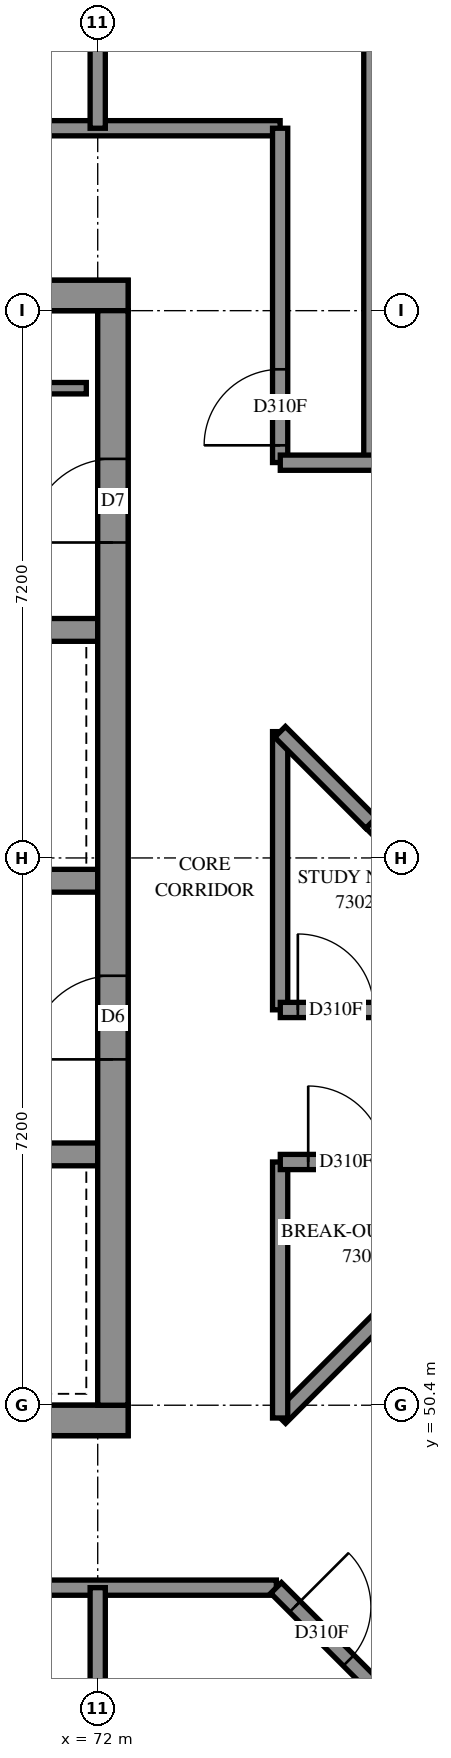
"""IFC4 building model, lengths in metres.
Left out: names, types, materials, properties, quantities, classifications, styles, units other than length and angle.
Written with IfcOpenShell. Run it as: python <this file> out.ifc"""

import sys

from ifc_helpers import new_model, si_unit, direction, frame, frame_2d, origin, place, context, subcontext, project, spatial, rectangle, extrude, element, fill, save


model = new_model("IFC4")
c1 = context("Model", 3, precision=1e-05, world=origin(), true_north=direction((0.0, 1.0)))
c2 = subcontext(c1, "Body", "Model", "MODEL_VIEW")
j1 = project(units=[si_unit("LENGTHUNIT", "METRE"), si_unit("PLANEANGLEUNIT", "RADIAN")], contexts=[c1])
p1 = place(None, origin())
s1 = spatial("IfcSite", under=j1, at=p1, CompositionType="ELEMENT")
p2 = place(p1, origin())
s2 = spatial("IfcBuilding", under=s1, at=p2, CompositionType="ELEMENT")
p3 = place(p2, frame((0.0, 0.0, 267.6)))
s3 = spatial("IfcBuildingStorey", under=s2, at=p3, CompositionType="ELEMENT", Elevation=267.6)
p4 = place(p3, frame((57.2, 50.2, -0.3), z_axis=(0.0, 0.0, 1.0), x_axis=(1.0, 0.0, 0.0)))
e1 = element("IfcWall", 1, at=p4, inside=s3, PredefinedType="SHEAR", context=c2, shape_type="SweptSolid", body=[
    extrude(rectangle(XDim=15.2, YDim=0.4, at=frame_2d((7.6, 0.0))), origin(), (0.0, 0.0, 1.0), 2.7),
])
p5 = place(p3, frame((57.2, 65.0, -0.3), z_axis=(0.0, 0.0, 1.0), x_axis=(1.0, 0.0, 0.0)))
e2 = element("IfcWall", 2, at=p5, inside=s3, PredefinedType="SHEAR", context=c2, shape_type="SweptSolid", body=[
    extrude(rectangle(XDim=15.2, YDim=0.4, at=frame_2d((7.6, 0.0))), origin(), (0.0, 0.0, 1.0), 2.7),
])
p6 = place(p5, frame((10.4, 0.0, 0.3)))
e3 = element("IfcOpeningElement", 3, at=p6, cuts=e2, PredefinedType="OPENING", context=c2, shape_type="SweptSolid", body=[
    extrude(rectangle(XDim=0.8, YDim=2.1, at=frame_2d((0.4, 1.05))), frame((0.0, 0.21, 0.0), z_axis=(0.0, -1.0, 0.0), x_axis=(1.0, 0.0, 0.0)), (0.0, 0.0, 1.0), 0.42),
])
p7 = place(p3, frame((72.2, 50.4, -0.3), z_axis=(0.0, 0.0, 1.0), x_axis=(0.0, 1.0, 0.0)))
e4 = element("IfcWall", 4, at=p7, inside=s3, PredefinedType="SHEAR", context=c2, shape_type="SweptSolid", body=[
    extrude(rectangle(XDim=14.4, YDim=0.4, at=frame_2d((7.2, 0.0))), origin(), (0.0, 0.0, 1.0), 2.7),
])
p8 = place(p7, frame((4.55, 0.0, 0.3)))
e5 = element("IfcOpeningElement", 5, at=p8, cuts=e4, PredefinedType="OPENING", context=c2, shape_type="SweptSolid", body=[
    extrude(rectangle(XDim=1.1, YDim=2.1, at=frame_2d((0.55, 1.05))), frame((0.0, 0.21, 0.0), z_axis=(0.0, -1.0, 0.0), x_axis=(1.0, 0.0, 0.0)), (0.0, 0.0, 1.0), 0.42),
])
p9 = place(p7, frame((11.35, 0.0, 0.3)))
e6 = element("IfcOpeningElement", 6, at=p9, cuts=e4, PredefinedType="OPENING", context=c2, shape_type="SweptSolid", body=[
    extrude(rectangle(XDim=1.1, YDim=2.1, at=frame_2d((0.55, 1.05))), frame((0.0, 0.21, 0.0), z_axis=(0.0, -1.0, 0.0), x_axis=(1.0, 0.0, 0.0)), (0.0, 0.0, 1.0), 0.42),
])
p10 = place(p3, frame((57.6, 53.7, 0.0), z_axis=(0.0, 0.0, 1.0), x_axis=(1.0, 0.0, 0.0)))
e7 = element("IfcWall", 7, at=p10, inside=s3, PredefinedType="SOLIDWALL", context=c2, shape_type="SweptSolid", body=[
    extrude(rectangle(XDim=14.4, YDim=0.3, at=frame_2d((7.2, 0.0))), origin(), (0.0, 0.0, 1.0), 3.1),
])
p11 = place(p10, frame((1.35, 0.0, 0.0)))
e8 = element("IfcOpeningElement", 8, at=p11, cuts=e7, PredefinedType="OPENING", context=c2, shape_type="SweptSolid", body=[
    extrude(rectangle(XDim=0.9, YDim=2.1, at=frame_2d((0.45, 1.05))), frame((0.0, 0.16, 0.0), z_axis=(0.0, -1.0, 0.0), x_axis=(1.0, 0.0, 0.0)), (0.0, 0.0, 1.0), 0.32),
])
p12 = place(p10, frame((4.95, 0.0, 0.0)))
e9 = element("IfcOpeningElement", 9, at=p12, cuts=e7, PredefinedType="OPENING", context=c2, shape_type="SweptSolid", body=[
    extrude(rectangle(XDim=0.9, YDim=2.1, at=frame_2d((0.45, 1.05))), frame((0.0, 0.16, 0.0), z_axis=(0.0, -1.0, 0.0), x_axis=(1.0, 0.0, 0.0)), (0.0, 0.0, 1.0), 0.32),
])
p13 = place(p10, frame((8.55, 0.0, 0.0)))
e10 = element("IfcOpeningElement", 10, at=p13, cuts=e7, PredefinedType="OPENING", context=c2, shape_type="SweptSolid", body=[
    extrude(rectangle(XDim=0.9, YDim=2.1, at=frame_2d((0.45, 1.05))), frame((0.0, 0.16, 0.0), z_axis=(0.0, -1.0, 0.0), x_axis=(1.0, 0.0, 0.0)), (0.0, 0.0, 1.0), 0.32),
])
p14 = place(p10, frame((12.05, 0.0, 0.0)))
e11 = element("IfcOpeningElement", 11, at=p14, cuts=e7, PredefinedType="OPENING", context=c2, shape_type="SweptSolid", body=[
    extrude(rectangle(XDim=1.1, YDim=2.1, at=frame_2d((0.55, 1.05))), frame((0.0, 0.16, 0.0), z_axis=(0.0, -1.0, 0.0), x_axis=(1.0, 0.0, 0.0)), (0.0, 0.0, 1.0), 0.32),
])
p15 = place(p3, frame((57.6, 57.3, 0.0), z_axis=(0.0, 0.0, 1.0), x_axis=(1.0, 0.0, 0.0)))
e12 = element("IfcWall", 12, at=p15, inside=s3, PredefinedType="SOLIDWALL", context=c2, shape_type="SweptSolid", body=[
    extrude(rectangle(XDim=14.4, YDim=0.3, at=frame_2d((7.2, 0.0))), origin(), (0.0, 0.0, 1.0), 3.1),
])
p16 = place(p15, frame((8.55, 0.0, 0.0)))
e13 = element("IfcOpeningElement", 13, at=p16, cuts=e12, PredefinedType="OPENING", context=c2, shape_type="SweptSolid", body=[
    extrude(rectangle(XDim=0.9, YDim=2.1, at=frame_2d((0.45, 1.05))), frame((0.0, 0.16, 0.0), z_axis=(0.0, -1.0, 0.0), x_axis=(1.0, 0.0, 0.0)), (0.0, 0.0, 1.0), 0.32),
])
p17 = place(p15, frame((1.25, 0.0, 0.0)))
e14 = element("IfcOpeningElement", 14, at=p17, cuts=e12, PredefinedType="OPENING", context=c2, shape_type="SweptSolid", body=[
    extrude(rectangle(XDim=1.1, YDim=2.1, at=frame_2d((0.55, 1.05))), frame((0.0, 0.16, 0.0), z_axis=(0.0, -1.0, 0.0), x_axis=(1.0, 0.0, 0.0)), (0.0, 0.0, 1.0), 0.32),
])
p18 = place(p15, frame((4.85, 0.0, 0.0)))
e15 = element("IfcOpeningElement", 15, at=p18, cuts=e12, PredefinedType="OPENING", context=c2, shape_type="SweptSolid", body=[
    extrude(rectangle(XDim=1.1, YDim=2.1, at=frame_2d((0.55, 1.05))), frame((0.0, 0.16, 0.0), z_axis=(0.0, -1.0, 0.0), x_axis=(1.0, 0.0, 0.0)), (0.0, 0.0, 1.0), 0.32),
])
p19 = place(p15, frame((12.05, 0.0, 0.0)))
e16 = element("IfcOpeningElement", 16, at=p19, cuts=e12, PredefinedType="OPENING", context=c2, shape_type="SweptSolid", body=[
    extrude(rectangle(XDim=1.1, YDim=2.1, at=frame_2d((0.55, 1.05))), frame((0.0, 0.16, 0.0), z_axis=(0.0, -1.0, 0.0), x_axis=(1.0, 0.0, 0.0)), (0.0, 0.0, 1.0), 0.32),
])
p20 = place(p3, frame((64.8, 60.6, 0.0), z_axis=(0.0, 0.0, 1.0), x_axis=(1.0, 0.0, 0.0)))
e17 = element("IfcWall", 17, at=p20, inside=s3, PredefinedType="SOLIDWALL", context=c2, shape_type="SweptSolid", body=[
    extrude(rectangle(XDim=7.2, YDim=0.3, at=frame_2d((3.6, 0.0))), origin(), (0.0, 0.0, 1.0), 3.1),
])
p21 = place(p3, frame((64.95, 63.78, 0.0), z_axis=(0.0, 0.0, 1.0), x_axis=(1.0, 0.0, 0.0)))
e18 = element("IfcWall", 18, at=p21, inside=s3, PredefinedType="PARTITIONING", context=c2, shape_type="SweptSolid", body=[
    extrude(rectangle(XDim=6.9, YDim=0.15, at=frame_2d((3.45, 0.0))), origin(), (0.0, 0.0, 1.0), 3.1),
])
p22 = place(p3, frame((55.2, 67.2, 0.0), z_axis=(0.0, 0.0, 1.0), x_axis=(1.0, 0.0, 0.0)))
e19 = element("IfcWall", 19, at=p22, inside=s3, PredefinedType="PARTITIONING", context=c2, shape_type="SweptSolid", body=[
    extrude(rectangle(XDim=19.2, YDim=0.2, at=frame_2d((9.6, 0.0))), origin(), (0.0, 0.0, 1.0), 3.1),
])
p23 = place(p22, frame((4.32, 0.0, 0.0)))
e20 = element("IfcOpeningElement", 20, at=p23, cuts=e19, PredefinedType="OPENING", context=c2, shape_type="SweptSolid", body=[
    extrude(rectangle(XDim=1.0, YDim=2.1, at=frame_2d((0.5, 1.05))), frame((0.0, 0.11, 0.0), z_axis=(0.0, -1.0, 0.0), x_axis=(1.0, 0.0, 0.0)), (0.0, 0.0, 1.0), 0.22),
])
p24 = place(p22, frame((8.338, 0.0, 0.0)))
e21 = element("IfcOpeningElement", 21, at=p24, cuts=e19, PredefinedType="OPENING", context=c2, shape_type="SweptSolid", body=[
    extrude(rectangle(XDim=1.0, YDim=2.1, at=frame_2d((0.5, 1.05))), frame((0.0, 0.11, 0.0), z_axis=(0.0, -1.0, 0.0), x_axis=(1.0, 0.0, 0.0)), (0.0, 0.0, 1.0), 0.22),
])
p25 = place(p22, frame((13.768, 0.0, 0.0)))
e22 = element("IfcOpeningElement", 22, at=p25, cuts=e19, PredefinedType="OPENING", context=c2, shape_type="SweptSolid", body=[
    extrude(rectangle(XDim=1.0, YDim=2.1, at=frame_2d((0.5, 1.05))), frame((0.0, 0.11, 0.0), z_axis=(0.0, -1.0, 0.0), x_axis=(1.0, 0.0, 0.0)), (0.0, 0.0, 1.0), 0.22),
])
p26 = place(p3, frame((55.2, 48.0, 0.0), z_axis=(0.0, 0.0, 1.0), x_axis=(1.0, 0.0, 0.0)))
e23 = element("IfcWall", 23, at=p26, inside=s3, PredefinedType="PARTITIONING", context=c2, shape_type="SweptSolid", body=[
    extrude(rectangle(XDim=19.15, YDim=0.2, at=frame_2d((9.575, 0.0))), origin(), (0.0, 0.0, 1.0), 3.1),
])
p27 = place(p26, frame((4.475, 0.0, 0.0)))
e24 = element("IfcOpeningElement", 24, at=p27, cuts=e23, PredefinedType="OPENING", context=c2, shape_type="SweptSolid", body=[
    extrude(rectangle(XDim=1.0, YDim=2.1, at=frame_2d((0.5, 1.05))), frame((0.0, 0.11, 0.0), z_axis=(0.0, -1.0, 0.0), x_axis=(1.0, 0.0, 0.0)), (0.0, 0.0, 1.0), 0.22),
])
p28 = place(p26, frame((8.301, 0.0, 0.0)))
e25 = element("IfcOpeningElement", 25, at=p28, cuts=e23, PredefinedType="OPENING", context=c2, shape_type="SweptSolid", body=[
    extrude(rectangle(XDim=0.9, YDim=2.1, at=frame_2d((0.45, 1.05))), frame((0.0, 0.11, 0.0), z_axis=(0.0, -1.0, 0.0), x_axis=(1.0, 0.0, 0.0)), (0.0, 0.0, 1.0), 0.22),
])
p29 = place(p26, frame((13.707, 0.0, 0.0)))
e26 = element("IfcOpeningElement", 26, at=p29, cuts=e23, PredefinedType="OPENING", context=c2, shape_type="SweptSolid", body=[
    extrude(rectangle(XDim=1.0, YDim=2.1, at=frame_2d((0.5, 1.05))), frame((0.0, 0.11, 0.0), z_axis=(0.0, -1.0, 0.0), x_axis=(1.0, 0.0, 0.0)), (0.0, 0.0, 1.0), 0.22),
])
p30 = place(p3, frame((75.6, 62.8, 0.0), z_axis=(0.0, 0.0, 1.0), x_axis=(0.0, 1.0, 0.0)))
e27 = element("IfcWall", 27, at=p30, inside=s3, PredefinedType="PARTITIONING", context=c2, shape_type="SweptSolid", body=[
    extrude(rectangle(XDim=10.043, YDim=0.2, at=frame_2d((5.021, 0.0))), origin(), (0.0, 0.0, 1.0), 3.1),
])
p31 = place(p3, frame((74.401, 50.233, 0.0), z_axis=(0.0, 0.0, 1.0), x_axis=(0.7071067812, 0.7071067812, 0.0)))
e28 = element("IfcWall", 28, at=p31, inside=s3, PredefinedType="PARTITIONING", context=c2, shape_type="SweptSolid", body=[
    extrude(rectangle(XDim=4.76, YDim=0.2, at=frame_2d((2.38, 0.0))), origin(), (0.0, 0.0, 1.0), 3.1),
])
p32 = place(p3, frame((74.347, 47.997, 0.0), z_axis=(0.0, 0.0, 1.0), x_axis=(0.7071067812, -0.7071067812, 0.0)))
e29 = element("IfcWall", 29, at=p32, inside=s3, PredefinedType="PARTITIONING", context=c2, shape_type="SweptSolid", body=[
    extrude(rectangle(XDim=4.596, YDim=0.2, at=frame_2d((2.298, 0.0))), origin(), (0.0, 0.0, 1.0), 3.1),
])
p33 = place(p32, frame((0.35, 0.0, 0.0)))
e30 = element("IfcOpeningElement", 30, at=p33, cuts=e29, PredefinedType="OPENING", context=c2, shape_type="SweptSolid", body=[
    extrude(rectangle(XDim=1.0, YDim=2.1, at=frame_2d((0.5, 1.05))), frame((0.0, 0.11, 0.0), z_axis=(0.0, -1.0, 0.0), x_axis=(1.0, 0.0, 0.0)), (0.0, 0.0, 1.0), 0.22),
])
for number, where, z_axis, x_axis in (
    (31, (72.0, 43.55, 0.0), (0.0, 0.0, 1.0), (0.0, 1.0, 0.0)),
    (32, (72.0, 67.2, 0.0), (0.0, 0.0, 1.0), (0.0, 1.0, 0.0)),
):
    element("IfcWall", number, at=place(p3, frame(where, z_axis=z_axis, x_axis=x_axis)), inside=s3, PredefinedType="PARTITIONING", context=c2, shape_type="SweptSolid", body=[
        extrude(rectangle(XDim=4.45, YDim=0.2, at=frame_2d((2.225, 0.0))), origin(), (0.0, 0.0, 1.0), 3.1),
    ])
p34 = place(p3, frame((74.4, 62.802, 0.0), z_axis=(0.0, 0.0, 1.0), x_axis=(0.0, 1.0, 0.0)))
e33 = element("IfcWall", 33, at=p34, inside=s3, PredefinedType="PARTITIONING", context=c2, shape_type="SweptSolid", body=[
    extrude(rectangle(XDim=4.398, YDim=0.2, at=frame_2d((2.199, 0.0))), origin(), (0.0, 0.0, 1.0), 3.1),
])
p35 = place(p34, frame((0.227, 0.0, 0.0)))
e34 = element("IfcOpeningElement", 34, at=p35, cuts=e33, PredefinedType="OPENING", context=c2, shape_type="SweptSolid", body=[
    extrude(rectangle(XDim=1.0, YDim=2.1, at=frame_2d((0.5, 1.05))), frame((0.0, 0.11, 0.0), z_axis=(0.0, -1.0, 0.0), x_axis=(1.0, 0.0, 0.0)), (0.0, 0.0, 1.0), 0.22),
])
p36 = place(p3, frame((74.402, 62.8, 0.0), z_axis=(0.0, 0.0, 1.0), x_axis=(1.0, 0.0, 0.0)))
e35 = element("IfcWall", 35, at=p36, inside=s3, PredefinedType="PARTITIONING", context=c2, shape_type="SweptSolid", body=[
    extrude(rectangle(XDim=4.398, YDim=0.2, at=frame_2d((2.199, 0.0))), origin(), (0.0, 0.0, 1.0), 3.1),
])
p37 = place(p36, frame((1.94, 0.0, 0.0)))
e36 = element("IfcOpeningElement", 36, at=p37, cuts=e35, PredefinedType="OPENING", context=c2, shape_type="SweptSolid", body=[
    extrude(rectangle(XDim=1.0, YDim=2.1, at=frame_2d((0.5, 1.05))), frame((0.0, 0.11, 0.0), z_axis=(0.0, -1.0, 0.0), x_axis=(1.0, 0.0, 0.0)), (0.0, 0.0, 1.0), 0.22),
])
p38 = place(p3, frame((74.4, 55.602, 0.0), z_axis=(0.0, 0.0, 1.0), x_axis=(0.0, 1.0, 0.0)))
e37 = element("IfcWall", 37, at=p38, inside=s3, PredefinedType="PARTITIONING", context=c2, shape_type="SweptSolid", body=[
    extrude(rectangle(XDim=3.66, YDim=0.2, at=frame_2d((1.83, 0.0))), origin(), (0.0, 0.0, 1.0), 3.1),
])
p39 = place(p3, frame((74.4, 50.232, 0.0), z_axis=(0.0, 0.0, 1.0), x_axis=(0.0, 1.0, 0.0)))
e38 = element("IfcWall", 38, at=p39, inside=s3, PredefinedType="PARTITIONING", context=c2, shape_type="SweptSolid", body=[
    extrude(rectangle(XDim=3.368, YDim=0.2, at=frame_2d((1.684, 0.0))), origin(), (0.0, 0.0, 1.0), 3.1),
])
p40 = place(p3, frame((74.402, 53.6, 0.0), z_axis=(0.0, 0.0, 1.0), x_axis=(1.0, 0.0, 0.0)))
e39 = element("IfcWall", 39, at=p40, inside=s3, PredefinedType="PARTITIONING", context=c2, shape_type="SweptSolid", body=[
    extrude(rectangle(XDim=3.366, YDim=0.2, at=frame_2d((1.683, 0.0))), origin(), (0.0, 0.0, 1.0), 3.1),
])
p41 = place(p40, frame((0.367, 0.0, 0.0)))
e40 = element("IfcOpeningElement", 40, at=p41, cuts=e39, PredefinedType="OPENING", context=c2, shape_type="SweptSolid", body=[
    extrude(rectangle(XDim=1.0, YDim=2.1, at=frame_2d((0.5, 1.05))), frame((0.0, 0.11, 0.0), z_axis=(0.0, -1.0, 0.0), x_axis=(1.0, 0.0, 0.0)), (0.0, 0.0, 1.0), 0.22),
])
p42 = place(p3, frame((74.402, 55.6, 0.0), z_axis=(0.0, 0.0, 1.0), x_axis=(1.0, 0.0, 0.0)))
e41 = element("IfcWall", 41, at=p42, inside=s3, PredefinedType="PARTITIONING", context=c2, shape_type="SweptSolid", body=[
    extrude(rectangle(XDim=2.758, YDim=0.2, at=frame_2d((1.379, 0.0))), origin(), (0.0, 0.0, 1.0), 3.1),
])
p43 = place(p42, frame((0.231, 0.0, 0.0)))
e42 = element("IfcOpeningElement", 42, at=p43, cuts=e41, PredefinedType="OPENING", context=c2, shape_type="SweptSolid", body=[
    extrude(rectangle(XDim=1.0, YDim=2.1, at=frame_2d((0.5, 1.05))), frame((0.0, 0.11, 0.0), z_axis=(0.0, -1.0, 0.0), x_axis=(1.0, 0.0, 0.0)), (0.0, 0.0, 1.0), 0.22),
])
p44 = place(p3, frame((75.599, 58.063, 0.0), z_axis=(0.0, 0.0, 1.0), x_axis=(0.7067069471, -0.7075063893, 0.0)))
e43 = element("IfcWall", 43, at=p44, inside=s3, PredefinedType="PARTITIONING", context=c2, shape_type="SweptSolid", body=[
    extrude(rectangle(XDim=2.502, YDim=0.2, at=frame_2d((1.251, 0.0))), origin(), (0.0, 0.0, 1.0), 3.1),
])
p45 = place(p3, frame((74.399, 59.259, 0.0), z_axis=(0.0, 0.0, 1.0), x_axis=(0.7071067812, -0.7071067812, 0.0)))
e44 = element("IfcWall", 44, at=p45, inside=s3, PredefinedType="PARTITIONING", context=c2, shape_type="SweptSolid", body=[
    extrude(rectangle(XDim=1.694, YDim=0.2, at=frame_2d((0.847, 0.0))), origin(), (0.0, 0.0, 1.0), 3.1),
])
p46 = place(p8, origin())
e45 = element("IfcDoor", 45, at=p46, inside=s3, OperationType="DOUBLE_DOOR_SINGLE_SWING", PredefinedType="DOOR", context=c2, shape_type="SweptSolid", body=[
    extrude(rectangle(XDim=1.1, YDim=2.1, at=frame_2d((0.55, 1.05))), frame((0.0, 0.025, 0.0), z_axis=(0.0, -1.0, 0.0), x_axis=(1.0, 0.0, 0.0)), (0.0, 0.0, 1.0), 0.05),
])
fill(e5, e45)
p47 = place(p9, origin())
e46 = element("IfcDoor", 46, at=p47, inside=s3, OperationType="SINGLE_SWING_RIGHT", PredefinedType="DOOR", context=c2, shape_type="SweptSolid", body=[
    extrude(rectangle(XDim=1.1, YDim=2.1, at=frame_2d((0.55, 1.05))), frame((0.0, 0.025, 0.0), z_axis=(0.0, -1.0, 0.0), x_axis=(1.0, 0.0, 0.0)), (0.0, 0.0, 1.0), 0.05),
])
fill(e6, e46)
p48 = place(p41, origin())
e47 = element("IfcDoor", 47, at=p48, inside=s3, OperationType="SINGLE_SWING_RIGHT", PredefinedType="DOOR", context=c2, shape_type="SweptSolid", body=[
    extrude(rectangle(XDim=1.0, YDim=2.1, at=frame_2d((0.5, 1.05))), frame((0.0, 0.025, 0.0), z_axis=(0.0, -1.0, 0.0), x_axis=(1.0, 0.0, 0.0)), (0.0, 0.0, 1.0), 0.05),
])
fill(e40, e47)
p49 = place(p33, origin())
e48 = element("IfcDoor", 48, at=p49, inside=s3, OperationType="SINGLE_SWING_LEFT", PredefinedType="DOOR", context=c2, shape_type="SweptSolid", body=[
    extrude(rectangle(XDim=1.0, YDim=2.1, at=frame_2d((0.5, 1.05))), frame((0.0, 0.025, 0.0), z_axis=(0.0, -1.0, 0.0), x_axis=(1.0, 0.0, 0.0)), (0.0, 0.0, 1.0), 0.05),
])
fill(e30, e48)
p50 = place(p43, origin())
e49 = element("IfcDoor", 49, at=p50, inside=s3, OperationType="SINGLE_SWING_LEFT", PredefinedType="DOOR", context=c2, shape_type="SweptSolid", body=[
    extrude(rectangle(XDim=1.0, YDim=2.1, at=frame_2d((0.5, 1.05))), frame((0.0, 0.025, 0.0), z_axis=(0.0, -1.0, 0.0), x_axis=(1.0, 0.0, 0.0)), (0.0, 0.0, 1.0), 0.05),
])
fill(e42, e49)
p51 = place(p35, origin())
e50 = element("IfcDoor", 50, at=p51, inside=s3, OperationType="SINGLE_SWING_RIGHT", PredefinedType="DOOR", context=c2, shape_type="SweptSolid", body=[
    extrude(rectangle(XDim=1.0, YDim=2.1, at=frame_2d((0.5, 1.05))), frame((0.0, 0.025, 0.0), z_axis=(0.0, -1.0, 0.0), x_axis=(1.0, 0.0, 0.0)), (0.0, 0.0, 1.0), 0.05),
])
fill(e34, e50)
save(model, sys.argv[1])
